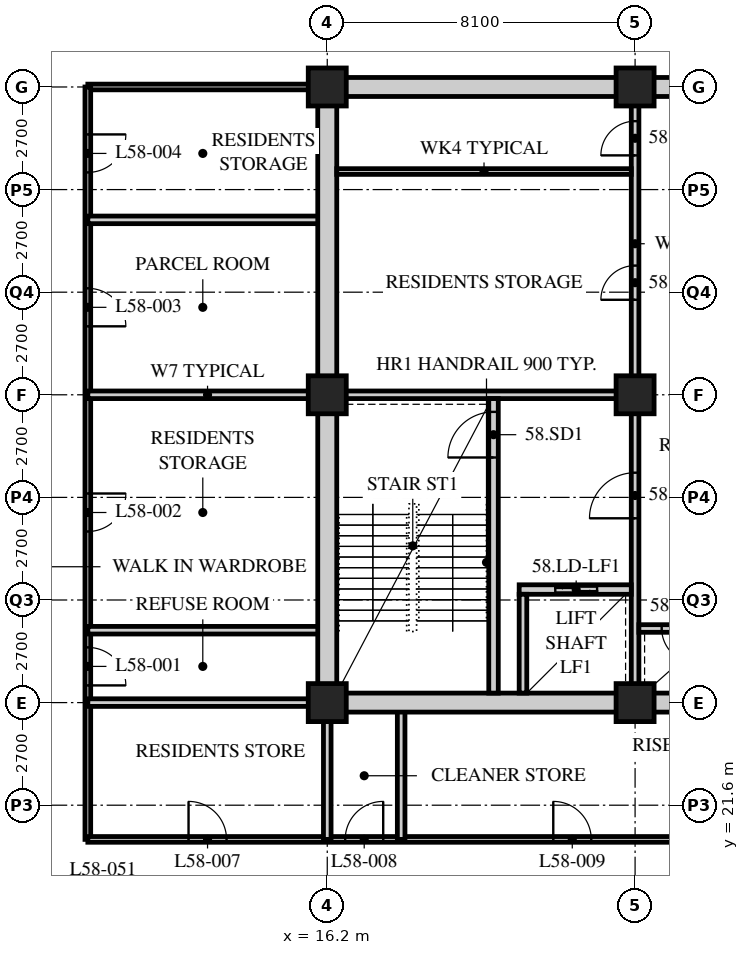
"""IFC4 building model, lengths in metres.
Left out: names, types, materials, properties, quantities, classifications, styles, units other than length and angle.
Written with IfcOpenShell. Run it as: python <this file> out.ifc"""

import sys

from ifc_helpers import new_model, si_unit, direction, frame, frame_2d, origin, origin_2d, place, context, subcontext, project, spatial, rectangle, hollow_rectangle, extrude, element, fill, save


model = new_model("IFC4")
c1 = context("Model", 3, precision=1e-05, world=origin(), true_north=direction((0.0, 1.0)))
c2 = subcontext(c1, "Body", "Model", "MODEL_VIEW")
j1 = project(units=[si_unit("LENGTHUNIT", "METRE"), si_unit("PLANEANGLEUNIT", "RADIAN")], contexts=[c1])
p1 = place(None, origin())
s1 = spatial("IfcSite", under=j1, at=p1, CompositionType="ELEMENT")
p2 = place(p1, origin())
s2 = spatial("IfcBuilding", under=s1, at=p2, CompositionType="ELEMENT")
p3 = place(p2, frame((0.0, 0.0, 224.4)))
s3 = spatial("IfcBuildingStorey", under=s2, at=p3, CompositionType="ELEMENT", Elevation=224.4)
for number, where, z_axis, x_axis in (
    (1, (16.2, 24.3, 0.0), (0.0, 0.0, 1.0), (1.0, 0.0, 0.0)),
    (2, (16.2, 32.4, 0.0), (0.0, 0.0, 1.0), (1.0, 0.0, 0.0)),
    (3, (16.2, 40.5, 0.0), (0.0, 0.0, 1.0), (1.0, 0.0, 0.0)),
    (4, (24.3, 24.3, 0.0), (0.0, 0.0, 1.0), (1.0, 0.0, 0.0)),
    (5, (24.3, 32.4, 0.0), (0.0, 0.0, 1.0), (1.0, 0.0, 0.0)),
    (6, (24.3, 40.5, 0.0), (0.0, 0.0, 1.0), (1.0, 0.0, 0.0)),
):
    element("IfcColumn", number, at=place(p3, frame(where, z_axis=z_axis, x_axis=x_axis)), inside=s3, PredefinedType="COLUMN", context=c2, shape_type="SweptSolid", body=[
        extrude(hollow_rectangle(XDim=1.0, YDim=1.0, WallThickness=0.1, at=origin_2d()), origin(), (0.0, 0.0, 1.0), 3.6),
    ])
p4 = place(p3, frame((16.0, 40.5, 0.0), z_axis=(0.0, 0.0, 1.0), x_axis=(-1.0, 0.0, 0.0)))
e7 = element("IfcWall", 7, at=p4, inside=s3, PredefinedType="PARTITIONING", context=c2, shape_type="SweptSolid", body=[
    extrude(rectangle(XDim=6.1, YDim=0.15, at=frame_2d((3.05, 0.0))), origin(), (0.0, 0.0, 1.0), 3.39),
])
p5 = place(p3, frame((9.9, 40.5, 0.0), z_axis=(0.0, 0.0, 1.0), x_axis=(0.0, -1.0, 0.0)))
e8 = element("IfcWall", 8, at=p5, inside=s3, PredefinedType="PARTITIONING", context=c2, shape_type="SweptSolid", body=[
    extrude(rectangle(XDim=19.8, YDim=0.15, at=frame_2d((9.9, 0.0))), origin(), (0.0, 0.0, 1.0), 3.39),
])
p6 = place(p5, frame((14.748, 0.0, 0.0)))
e9 = element("IfcOpeningElement", 9, at=p6, cuts=e8, PredefinedType="OPENING", context=c2, shape_type="SweptSolid", body=[
    extrude(rectangle(XDim=1.0, YDim=2.1, at=frame_2d((0.5, 1.05))), frame((0.0, 0.085, 0.0), z_axis=(0.0, -1.0, 0.0), x_axis=(1.0, 0.0, 0.0)), (0.0, 0.0, 1.0), 0.17),
])
p7 = place(p5, frame((10.698, 0.0, 0.0)))
e10 = element("IfcOpeningElement", 10, at=p7, cuts=e8, PredefinedType="OPENING", context=c2, shape_type="SweptSolid", body=[
    extrude(rectangle(XDim=1.0, YDim=2.1, at=frame_2d((0.5, 1.05))), frame((0.0, 0.085, 0.0), z_axis=(0.0, -1.0, 0.0), x_axis=(1.0, 0.0, 0.0)), (0.0, 0.0, 1.0), 0.17),
])
p8 = place(p5, frame((5.298, 0.0, 0.0)))
e11 = element("IfcOpeningElement", 11, at=p8, cuts=e8, PredefinedType="OPENING", context=c2, shape_type="SweptSolid", body=[
    extrude(rectangle(XDim=1.0, YDim=2.1, at=frame_2d((0.5, 1.05))), frame((0.0, 0.085, 0.0), z_axis=(0.0, -1.0, 0.0), x_axis=(1.0, 0.0, 0.0)), (0.0, 0.0, 1.0), 0.17),
])
p9 = place(p5, frame((1.248, 0.0, 0.0)))
e12 = element("IfcOpeningElement", 12, at=p9, cuts=e8, PredefinedType="OPENING", context=c2, shape_type="SweptSolid", body=[
    extrude(rectangle(XDim=1.0, YDim=2.1, at=frame_2d((0.5, 1.05))), frame((0.0, 0.085, 0.0), z_axis=(0.0, -1.0, 0.0), x_axis=(1.0, 0.0, 0.0)), (0.0, 0.0, 1.0), 0.17),
])
p10 = place(p3, frame((9.9, 20.7, 0.0), z_axis=(0.0, 0.0, 1.0), x_axis=(1.0, 0.0, 0.0)))
e13 = element("IfcWall", 13, at=p10, inside=s3, PredefinedType="PARTITIONING", context=c2, shape_type="SweptSolid", body=[
    extrude(rectangle(XDim=17.24, YDim=0.15, at=frame_2d((8.62, 0.0))), origin(), (0.0, 0.0, 1.0), 3.39),
])
p11 = place(p10, frame((2.65, 0.0, 0.0)))
e14 = element("IfcOpeningElement", 14, at=p11, cuts=e13, PredefinedType="OPENING", context=c2, shape_type="SweptSolid", body=[
    extrude(rectangle(XDim=1.0, YDim=2.1, at=frame_2d((0.5, 1.05))), frame((0.0, 0.085, 0.0), z_axis=(0.0, -1.0, 0.0), x_axis=(1.0, 0.0, 0.0)), (0.0, 0.0, 1.0), 0.17),
])
p12 = place(p10, frame((6.772, 0.0, 0.0)))
e15 = element("IfcOpeningElement", 15, at=p12, cuts=e13, PredefinedType="OPENING", context=c2, shape_type="SweptSolid", body=[
    extrude(rectangle(XDim=1.0, YDim=2.1, at=frame_2d((0.5, 1.05))), frame((0.0, 0.085, 0.0), z_axis=(0.0, -1.0, 0.0), x_axis=(1.0, 0.0, 0.0)), (0.0, 0.0, 1.0), 0.17),
])
p13 = place(p10, frame((12.247, 0.0, 0.0)))
e16 = element("IfcOpeningElement", 16, at=p13, cuts=e13, PredefinedType="OPENING", context=c2, shape_type="SweptSolid", body=[
    extrude(rectangle(XDim=1.0, YDim=2.1, at=frame_2d((0.5, 1.05))), frame((0.0, 0.085, 0.0), z_axis=(0.0, -1.0, 0.0), x_axis=(1.0, 0.0, 0.0)), (0.0, 0.0, 1.0), 0.17),
])
for number, where, z_axis, x_axis in (
    (17, (9.9, 32.4, 0.0), (0.0, 0.0, 1.0), (1.0, 0.0, 0.0)),
    (18, (9.9, 26.205, 0.0), (0.0, 0.0, 1.0), (1.0, 0.0, 0.0)),
    (19, (9.9, 37.003, 0.0), (0.0, 0.0, 1.0), (1.0, 0.0, 0.0)),
):
    element("IfcWall", number, at=place(p3, frame(where, z_axis=z_axis, x_axis=x_axis)), inside=s3, PredefinedType="SOLIDWALL", context=c2, shape_type="SweptSolid", body=[
        extrude(rectangle(XDim=6.3, YDim=0.2, at=frame_2d((3.15, 0.0))), origin(), (0.0, 0.0, 1.0), 3.39),
    ])
p14 = place(p3, frame((16.2, 20.7, 0.0), z_axis=(0.0, 0.0, 1.0), x_axis=(0.0, 1.0, 0.0)))
e20 = element("IfcWall", 20, at=p14, inside=s3, PredefinedType="SOLIDWALL", context=c2, shape_type="SweptSolid", body=[
    extrude(rectangle(XDim=3.6, YDim=0.2, at=frame_2d((1.8, 0.0))), origin(), (0.0, 0.0, 1.0), 2.628),
])
p15 = place(p3, frame((18.144, 20.7, 0.0), z_axis=(0.0, 0.0, 1.0), x_axis=(0.0, 1.0, 0.0)))
e21 = element("IfcWall", 21, at=p15, inside=s3, PredefinedType="SOLIDWALL", context=c2, shape_type="SweptSolid", body=[
    extrude(rectangle(XDim=3.6, YDim=0.2, at=frame_2d((1.8, 0.0))), origin(), (0.0, 0.0, 1.0), 3.39),
])
p16 = place(p3, frame((9.9, 24.3, 0.0), z_axis=(0.0, 0.0, 1.0), x_axis=(1.0, 0.0, 0.0)))
e22 = element("IfcWall", 22, at=p16, inside=s3, PredefinedType="SOLIDWALL", context=c2, shape_type="SweptSolid", body=[
    extrude(rectangle(XDim=6.3, YDim=0.2, at=frame_2d((3.15, 0.0))), origin(), (0.0, 0.0, 1.0), 3.39),
])
p17 = place(p3, frame((15.95, 24.3, 0.0), z_axis=(0.0, 0.0, 1.0), x_axis=(1.0, 0.0, 0.0)))
e23 = element("IfcWall", 23, at=p17, inside=s3, PredefinedType="SOLIDWALL", context=c2, shape_type="SweptSolid", body=[
    extrude(rectangle(XDim=24.8, YDim=0.5, at=frame_2d((12.4, 0.0))), origin(), (0.0, 0.0, 1.0), 2.628),
])
p18 = place(p17, frame((11.5, 0.0, 0.0)))
e24 = element("IfcOpeningElement", 24, at=p18, cuts=e23, PredefinedType="OPENING", context=c2, shape_type="SweptSolid", body=[
    extrude(rectangle(XDim=1.8, YDim=2.4, at=frame_2d((0.9, 1.2))), frame((0.0, 0.26, 0.0), z_axis=(0.0, -1.0, 0.0), x_axis=(1.0, 0.0, 0.0)), (0.0, 0.0, 1.0), 0.52),
])
p19 = place(p3, frame((15.95, 40.5, 0.0), z_axis=(0.0, 0.0, 1.0), x_axis=(1.0, 0.0, 0.0)))
e25 = element("IfcWall", 25, at=p19, inside=s3, PredefinedType="SOLIDWALL", context=c2, shape_type="SweptSolid", body=[
    extrude(rectangle(XDim=24.8, YDim=0.5, at=frame_2d((12.4, 0.0))), origin(), (0.0, 0.0, 1.0), 2.628),
])
p20 = place(p19, frame((11.5, 0.0, 0.0)))
e26 = element("IfcOpeningElement", 26, at=p20, cuts=e25, PredefinedType="OPENING", context=c2, shape_type="SweptSolid", body=[
    extrude(rectangle(XDim=1.8, YDim=2.4, at=frame_2d((0.9, 1.2))), frame((0.0, 0.26, 0.0), z_axis=(0.0, -1.0, 0.0), x_axis=(1.0, 0.0, 0.0)), (0.0, 0.0, 1.0), 0.52),
])
p21 = place(p3, frame((16.2, 24.55, 0.0), z_axis=(0.0, 0.0, 1.0), x_axis=(0.0, 1.0, 0.0)))
e27 = element("IfcWall", 27, at=p21, inside=s3, PredefinedType="SOLIDWALL", context=c2, shape_type="SweptSolid", body=[
    extrude(rectangle(XDim=15.7, YDim=0.5, at=frame_2d((7.85, 0.0))), origin(), (0.0, 0.0, 1.0), 2.628),
])
p22 = place(p3, frame((16.45, 32.4, 0.0), z_axis=(0.0, 0.0, 1.0), x_axis=(1.0, 0.0, 0.0)))
e28 = element("IfcWall", 28, at=p22, inside=s3, PredefinedType="SOLIDWALL", context=c2, shape_type="SweptSolid", body=[
    extrude(rectangle(XDim=7.95, YDim=0.2, at=frame_2d((3.975, 0.0))), origin(), (0.0, 0.0, 1.0), 2.778),
])
p23 = place(p3, frame((24.3, 24.55, 0.0), z_axis=(0.0, 0.0, 1.0), x_axis=(0.0, 1.0, 0.0)))
e29 = element("IfcWall", 29, at=p23, inside=s3, PredefinedType="SOLIDWALL", context=c2, shape_type="SweptSolid", body=[
    extrude(rectangle(XDim=7.75, YDim=0.2, at=frame_2d((3.875, 0.0))), origin(), (0.0, 0.0, 1.0), 2.778),
])
p24 = place(p23, frame((4.6, 0.0, 0.0)))
e30 = element("IfcOpeningElement", 30, at=p24, cuts=e29, PredefinedType="OPENING", context=c2, shape_type="SweptSolid", body=[
    extrude(rectangle(XDim=1.2, YDim=2.1, at=frame_2d((0.6, 1.05))), frame((0.0, 0.11, 0.0), z_axis=(0.0, -1.0, 0.0), x_axis=(1.0, 0.0, 0.0)), (0.0, 0.0, 1.0), 0.22),
])
p25 = place(p3, frame((20.575, 24.55, 0.0), z_axis=(0.0, 0.0, 1.0), x_axis=(0.0, 1.0, 0.0)))
e31 = element("IfcWall", 31, at=p25, inside=s3, PredefinedType="SOLIDWALL", context=c2, shape_type="SweptSolid", body=[
    extrude(rectangle(XDim=7.75, YDim=0.25, at=frame_2d((3.875, 0.0))), origin(), (0.0, 0.0, 1.0), 3.39),
])
p26 = place(p25, frame((6.2, 0.0, 0.0)))
e32 = element("IfcOpeningElement", 32, at=p26, cuts=e31, PredefinedType="OPENING", context=c2, shape_type="SweptSolid", body=[
    extrude(rectangle(XDim=1.2, YDim=2.1, at=frame_2d((0.6, 1.05))), frame((0.0, 0.135, 0.0), z_axis=(0.0, -1.0, 0.0), x_axis=(1.0, 0.0, 0.0)), (0.0, 0.0, 1.0), 0.27),
])
p27 = place(p3, frame((21.25, 27.275, 0.0), z_axis=(0.0, 0.0, 1.0), x_axis=(1.0, 0.0, 0.0)))
e33 = element("IfcWall", 33, at=p27, inside=s3, PredefinedType="SOLIDWALL", context=c2, shape_type="SweptSolid", body=[
    extrude(rectangle(XDim=2.95, YDim=0.25, at=frame_2d((1.475, 0.0))), origin(), (0.0, 0.0, 1.0), 3.39),
])
p28 = place(p27, frame((0.95, 0.0, 0.0)))
e34 = element("IfcOpeningElement", 34, at=p28, cuts=e33, PredefinedType="OPENING", context=c2, shape_type="SweptSolid", body=[
    extrude(rectangle(XDim=1.1, YDim=2.4, at=frame_2d((0.55, 1.2))), frame((0.0, 0.135, 0.0), z_axis=(0.0, -1.0, 0.0), x_axis=(1.0, 0.0, 0.0)), (0.0, 0.0, 1.0), 0.27),
])
p29 = place(p3, frame((21.35, 24.55, 0.0), z_axis=(0.0, 0.0, 1.0), x_axis=(0.0, 1.0, 0.0)))
e35 = element("IfcWall", 35, at=p29, inside=s3, PredefinedType="SOLIDWALL", context=c2, shape_type="SweptSolid", body=[
    extrude(rectangle(XDim=2.6, YDim=0.2, at=frame_2d((1.3, 0.0))), origin(), (0.0, 0.0, 1.0), 3.39),
])
p30 = place(p3, frame((24.4, 26.25, 0.0), z_axis=(0.0, 0.0, 1.0), x_axis=(1.0, 0.0, 0.0)))
e36 = element("IfcWall", 36, at=p30, inside=s3, PredefinedType="SOLIDWALL", context=c2, shape_type="SweptSolid", body=[
    extrude(rectangle(XDim=2.15, YDim=0.2, at=frame_2d((1.075, 0.0))), origin(), (0.0, 0.0, 1.0), 3.39),
])
p31 = place(p30, frame((0.6, 0.0, 0.0)))
e37 = element("IfcOpeningElement", 37, at=p31, cuts=e36, PredefinedType="OPENING", context=c2, shape_type="SweptSolid", body=[
    extrude(rectangle(XDim=0.9, YDim=2.1, at=frame_2d((0.45, 1.05))), frame((0.0, 0.11, 0.0), z_axis=(0.0, -1.0, 0.0), x_axis=(1.0, 0.0, 0.0)), (0.0, 0.0, 1.0), 0.22),
])
p32 = place(p3, frame((24.3, 32.5, 0.0), z_axis=(0.0, 0.0, 1.0), x_axis=(0.0, 1.0, 0.0)))
e38 = element("IfcWall", 38, at=p32, inside=s3, PredefinedType="PARTITIONING", context=c2, shape_type="SweptSolid", body=[
    extrude(rectangle(XDim=7.75, YDim=0.2, at=frame_2d((3.875, 0.0))), origin(), (0.0, 0.0, 1.0), 2.778),
])
p33 = place(p32, frame((2.4, 0.0, 0.0)))
e39 = element("IfcOpeningElement", 39, at=p33, cuts=e38, PredefinedType="OPENING", context=c2, shape_type="SweptSolid", body=[
    extrude(rectangle(XDim=0.9, YDim=2.1, at=frame_2d((0.45, 1.05))), frame((0.0, 0.11, 0.0), z_axis=(0.0, -1.0, 0.0), x_axis=(1.0, 0.0, 0.0)), (0.0, 0.0, 1.0), 0.22),
])
p34 = place(p32, frame((6.2, 0.0, 0.0)))
e40 = element("IfcOpeningElement", 40, at=p34, cuts=e38, PredefinedType="OPENING", context=c2, shape_type="SweptSolid", body=[
    extrude(rectangle(XDim=0.9, YDim=2.1, at=frame_2d((0.45, 1.05))), frame((0.0, 0.11, 0.0), z_axis=(0.0, -1.0, 0.0), x_axis=(1.0, 0.0, 0.0)), (0.0, 0.0, 1.0), 0.22),
])
p35 = place(p3, frame((16.45, 38.275, 0.0), z_axis=(0.0, 0.0, 1.0), x_axis=(1.0, 0.0, 0.0)))
e41 = element("IfcWall", 41, at=p35, inside=s3, PredefinedType="PARTITIONING", context=c2, shape_type="SweptSolid", body=[
    extrude(rectangle(XDim=7.75, YDim=0.15, at=frame_2d((3.875, 0.0))), origin(), (0.0, 0.0, 1.0), 3.39),
])
p36 = place(p6, origin())
e42 = element("IfcDoor", 42, at=p36, inside=s3, OperationType="SINGLE_SWING_RIGHT", PredefinedType="DOOR", context=c2, shape_type="SweptSolid", body=[
    extrude(rectangle(XDim=1.0, YDim=2.1, at=frame_2d((0.5, 1.05))), frame((0.0, 0.025, 0.0), z_axis=(0.0, -1.0, 0.0), x_axis=(1.0, 0.0, 0.0)), (0.0, 0.0, 1.0), 0.05),
])
fill(e9, e42)
p37 = place(p7, origin())
e43 = element("IfcDoor", 43, at=p37, inside=s3, OperationType="SINGLE_SWING_LEFT", PredefinedType="DOOR", context=c2, shape_type="SweptSolid", body=[
    extrude(rectangle(XDim=1.0, YDim=2.1, at=frame_2d((0.5, 1.05))), frame((0.0, 0.025, 0.0), z_axis=(0.0, -1.0, 0.0), x_axis=(1.0, 0.0, 0.0)), (0.0, 0.0, 1.0), 0.05),
])
fill(e10, e43)
p38 = place(p8, origin())
e44 = element("IfcDoor", 44, at=p38, inside=s3, OperationType="SINGLE_SWING_RIGHT", PredefinedType="DOOR", context=c2, shape_type="SweptSolid", body=[
    extrude(rectangle(XDim=1.0, YDim=2.1, at=frame_2d((0.5, 1.05))), frame((0.0, 0.025, 0.0), z_axis=(0.0, -1.0, 0.0), x_axis=(1.0, 0.0, 0.0)), (0.0, 0.0, 1.0), 0.05),
])
fill(e11, e44)
p39 = place(p9, origin())
e45 = element("IfcDoor", 45, at=p39, inside=s3, OperationType="SINGLE_SWING_LEFT", PredefinedType="DOOR", context=c2, shape_type="SweptSolid", body=[
    extrude(rectangle(XDim=1.0, YDim=2.1, at=frame_2d((0.5, 1.05))), frame((0.0, 0.025, 0.0), z_axis=(0.0, -1.0, 0.0), x_axis=(1.0, 0.0, 0.0)), (0.0, 0.0, 1.0), 0.05),
])
fill(e12, e45)
p40 = place(p11, origin())
e46 = element("IfcDoor", 46, at=p40, inside=s3, OperationType="SINGLE_SWING_LEFT", PredefinedType="DOOR", context=c2, shape_type="SweptSolid", body=[
    extrude(rectangle(XDim=1.0, YDim=2.1, at=frame_2d((0.5, 1.05))), frame((0.0, 0.025, 0.0), z_axis=(0.0, -1.0, 0.0), x_axis=(1.0, 0.0, 0.0)), (0.0, 0.0, 1.0), 0.05),
])
fill(e14, e46)
p41 = place(p12, origin())
e47 = element("IfcDoor", 47, at=p41, inside=s3, OperationType="SINGLE_SWING_RIGHT", PredefinedType="DOOR", context=c2, shape_type="SweptSolid", body=[
    extrude(rectangle(XDim=1.0, YDim=2.1, at=frame_2d((0.5, 1.05))), frame((0.0, 0.025, 0.0), z_axis=(0.0, -1.0, 0.0), x_axis=(1.0, 0.0, 0.0)), (0.0, 0.0, 1.0), 0.05),
])
fill(e15, e47)
p42 = place(p13, origin())
e48 = element("IfcDoor", 48, at=p42, inside=s3, OperationType="SINGLE_SWING_LEFT", PredefinedType="DOOR", context=c2, shape_type="SweptSolid", body=[
    extrude(rectangle(XDim=1.0, YDim=2.1, at=frame_2d((0.5, 1.05))), frame((0.0, 0.025, 0.0), z_axis=(0.0, -1.0, 0.0), x_axis=(1.0, 0.0, 0.0)), (0.0, 0.0, 1.0), 0.05),
])
fill(e16, e48)
p43 = place(p33, origin())
e49 = element("IfcDoor", 49, at=p43, inside=s3, OperationType="SINGLE_SWING_LEFT", PredefinedType="DOOR", context=c2, shape_type="SweptSolid", body=[
    extrude(rectangle(XDim=0.9, YDim=2.1, at=frame_2d((0.45, 1.05))), frame((0.0, 0.025, 0.0), z_axis=(0.0, -1.0, 0.0), x_axis=(1.0, 0.0, 0.0)), (0.0, 0.0, 1.0), 0.05),
])
fill(e39, e49)
p44 = place(p34, origin())
e50 = element("IfcDoor", 50, at=p44, inside=s3, OperationType="SINGLE_SWING_LEFT", PredefinedType="DOOR", context=c2, shape_type="SweptSolid", body=[
    extrude(rectangle(XDim=0.9, YDim=2.1, at=frame_2d((0.45, 1.05))), frame((0.0, 0.025, 0.0), z_axis=(0.0, -1.0, 0.0), x_axis=(1.0, 0.0, 0.0)), (0.0, 0.0, 1.0), 0.05),
])
fill(e40, e50)
p45 = place(p26, origin())
e51 = element("IfcDoor", 51, at=p45, inside=s3, OperationType="SINGLE_SWING_LEFT", PredefinedType="DOOR", context=c2, shape_type="SweptSolid", body=[
    extrude(rectangle(XDim=1.2, YDim=2.1, at=frame_2d((0.6, 1.05))), frame((0.0, 0.025, 0.0), z_axis=(0.0, -1.0, 0.0), x_axis=(1.0, 0.0, 0.0)), (0.0, 0.0, 1.0), 0.05),
])
fill(e32, e51)
p46 = place(p24, origin())
e52 = element("IfcDoor", 52, at=p46, inside=s3, OperationType="SINGLE_SWING_LEFT", PredefinedType="DOOR", context=c2, shape_type="SweptSolid", body=[
    extrude(rectangle(XDim=1.2, YDim=2.1, at=frame_2d((0.6, 1.05))), frame((0.0, 0.025, 0.0), z_axis=(0.0, -1.0, 0.0), x_axis=(1.0, 0.0, 0.0)), (0.0, 0.0, 1.0), 0.05),
])
fill(e30, e52)
p47 = place(p31, origin())
e53 = element("IfcDoor", 53, at=p47, inside=s3, OperationType="SINGLE_SWING_LEFT", PredefinedType="DOOR", context=c2, shape_type="SweptSolid", body=[
    extrude(rectangle(XDim=0.9, YDim=2.1, at=frame_2d((0.45, 1.05))), frame((0.0, 0.025, 0.0), z_axis=(0.0, -1.0, 0.0), x_axis=(1.0, 0.0, 0.0)), (0.0, 0.0, 1.0), 0.05),
])
fill(e37, e53)
p48 = place(p28, origin())
e54 = element("IfcDoor", 54, at=p48, inside=s3, OperationType="DOUBLE_DOOR_SLIDING", PredefinedType="DOOR", context=c2, shape_type="SweptSolid", body=[
    extrude(rectangle(XDim=1.1, YDim=2.4, at=frame_2d((0.55, 1.2))), frame((0.0, 0.025, 0.0), z_axis=(0.0, -1.0, 0.0), x_axis=(1.0, 0.0, 0.0)), (0.0, 0.0, 1.0), 0.05),
])
fill(e34, e54)
save(model, sys.argv[1])
